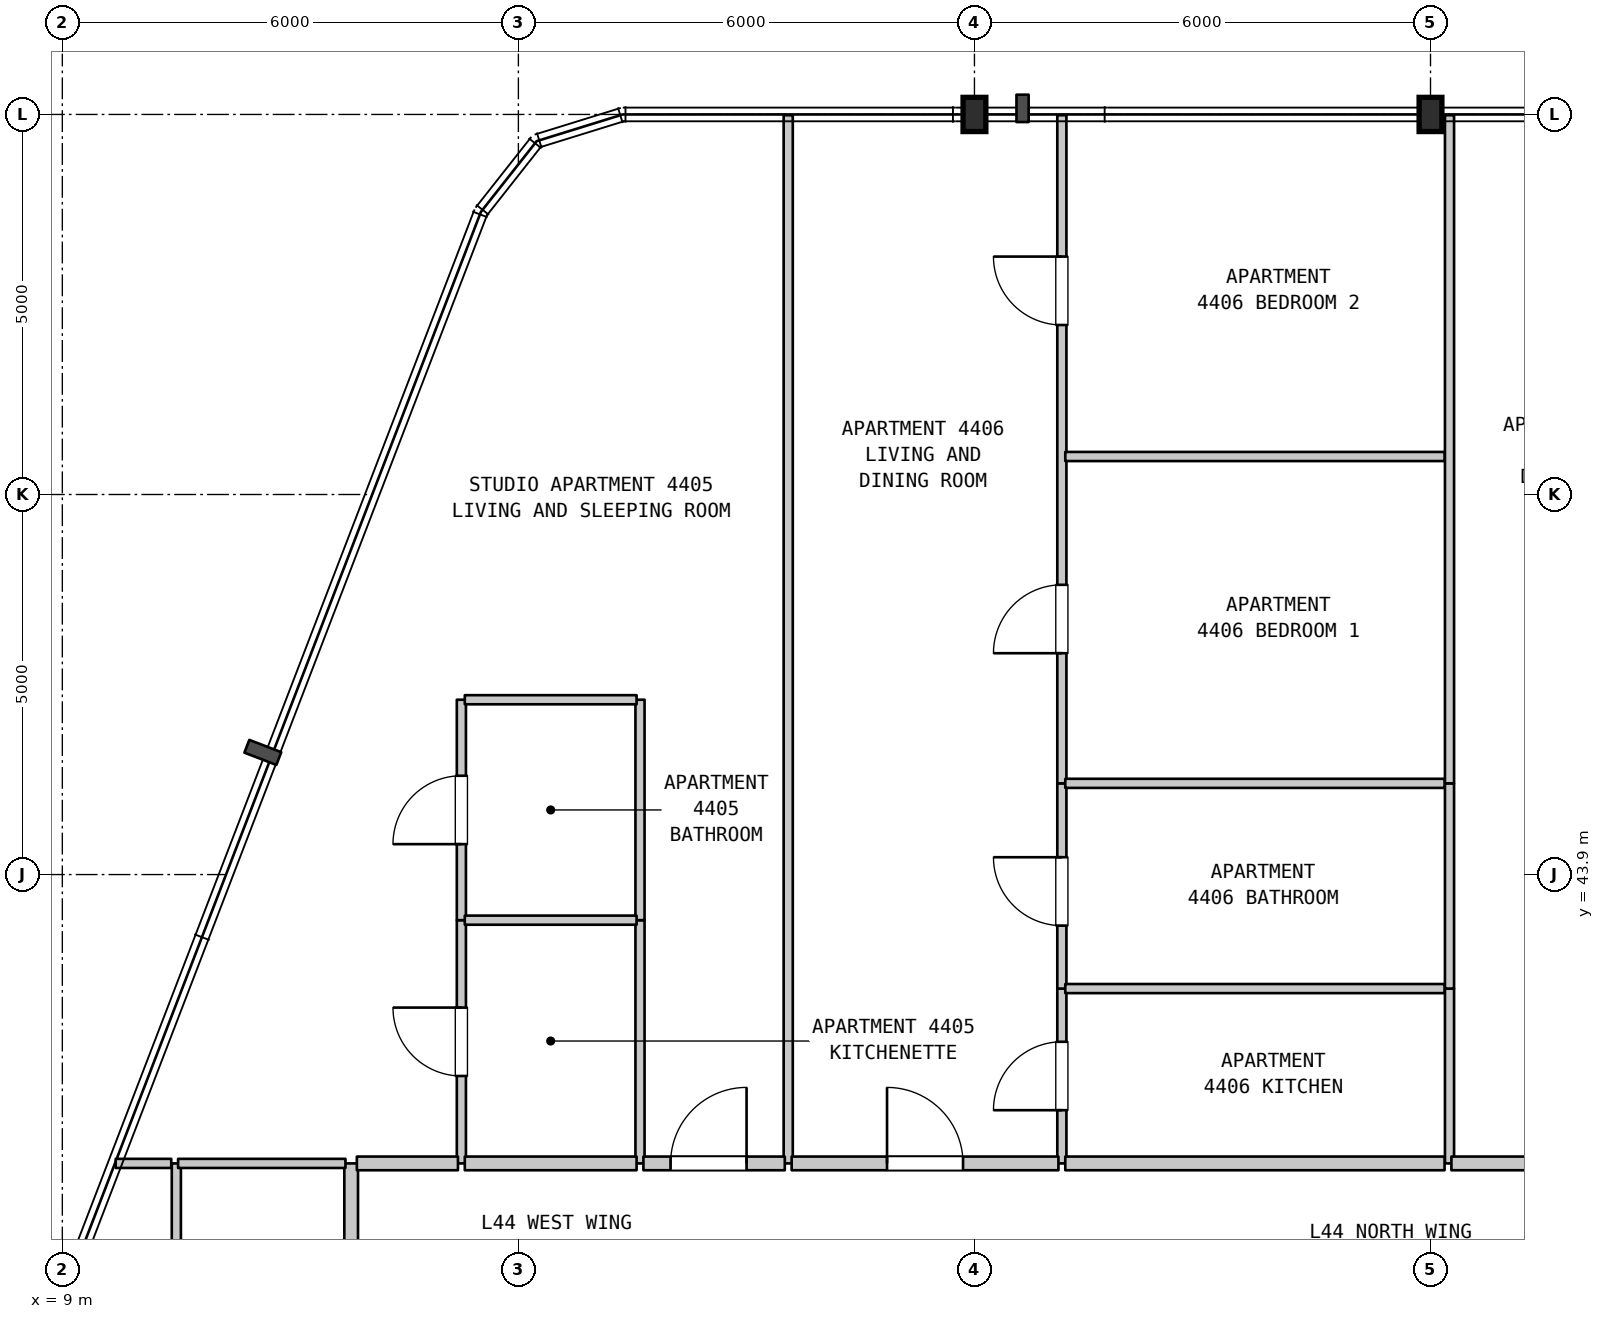
"""IFC4 building model, lengths in metres.
Left out: names, types, materials, properties, quantities, classifications, styles, units other than length and angle.
Written with IfcOpenShell. Run it as: python <this file> out.ifc"""

import sys

from ifc_helpers import new_model, si_unit, direction, frame, frame_2d, origin, origin_2d, place, context, subcontext, project, spatial, rectangle, i_section, extrude, element, fill, save


model = new_model("IFC4")
c1 = context("Model", 3, precision=1e-05, world=origin(), true_north=direction((0.0, 1.0)))
c2 = subcontext(c1, "Body", "Model", "MODEL_VIEW")
j1 = project(units=[si_unit("LENGTHUNIT", "METRE"), si_unit("PLANEANGLEUNIT", "RADIAN")], contexts=[c1])
p1 = place(None, origin())
s1 = spatial("IfcSite", under=j1, at=p1, CompositionType="ELEMENT")
p2 = place(p1, origin())
s2 = spatial("IfcBuilding", under=s1, at=p2, CompositionType="ELEMENT")
p3 = place(p2, frame((0.0, 0.0, 180.2)))
s3 = spatial("IfcBuildingStorey", under=s2, at=p3, CompositionType="ELEMENT", Elevation=180.2)
for number, where, z_axis, x_axis in (
    (1, (21.0, 53.9, 0.0), (0.0, 0.0, 1.0), (1.0, 0.0, 0.0)),
    (2, (27.0, 53.9, 0.0), (0.0, 0.0, 1.0), (1.0, 0.0, 0.0)),
):
    element("IfcColumn", number, at=place(p3, frame(where, z_axis=z_axis, x_axis=x_axis)), inside=s3, PredefinedType="COLUMN", context=c2, shape_type="SweptSolid", body=[
        extrude(i_section(OverallWidth=0.3, OverallDepth=0.45, WebThickness=0.014, FlangeThickness=0.026, FilletRadius=0.027, at=origin_2d()), origin(), (0.0, 0.0, 1.0), 3.7),
    ])
p4 = place(p3, frame((10.5, 31.45, 0.0), z_axis=(0.0, 0.0, 1.0), x_axis=(0.0, 1.0, 0.0)))
e3 = element("IfcWall", 3, at=p4, inside=s3, PredefinedType="PARTITIONING", context=c2, shape_type="SweptSolid", body=[
    extrude(rectangle(XDim=8.65, YDim=0.12, at=frame_2d((4.325, 0.0))), origin(), (0.0, 0.0, 1.0), 3.38),
])
p5 = place(p3, frame((12.8, 31.45, 0.0), z_axis=(0.0, 0.0, 1.0), x_axis=(0.0, 1.0, 0.0)))
e4 = element("IfcWall", 4, at=p5, inside=s3, PredefinedType="STANDARD", context=c2, shape_type="SweptSolid", body=[
    extrude(rectangle(XDim=8.65, YDim=0.18, at=frame_2d((4.325, 0.0))), origin(), (0.0, 0.0, 1.0), 3.38),
])
p6 = place(p3, frame((14.25, 40.1, 0.0), z_axis=(0.0, 0.0, 1.0), x_axis=(0.0, 1.0, 0.0)))
e5 = element("IfcWall", 5, at=p6, inside=s3, PredefinedType="PARTITIONING", context=c2, shape_type="SweptSolid", body=[
    extrude(rectangle(XDim=3.2, YDim=0.12, at=frame_2d((1.6, 0.0))), origin(), (0.0, 0.0, 1.0), 3.38),
])
p7 = place(p6, frame((1.15, 0.0, 0.0)))
e6 = element("IfcOpeningElement", 6, at=p7, cuts=e5, PredefinedType="OPENING", context=c2, shape_type="SweptSolid", body=[
    extrude(rectangle(XDim=0.9, YDim=2.15, at=frame_2d((0.45, 1.075))), frame((0.0, 0.07, 0.0), z_axis=(0.0, -1.0, 0.0), x_axis=(1.0, 0.0, 0.0)), (0.0, 0.0, 1.0), 0.14),
])
p8 = place(p3, frame((14.25, 43.3, 0.0), z_axis=(0.0, 0.0, 1.0), x_axis=(0.0, 1.0, 0.0)))
e7 = element("IfcWall", 7, at=p8, inside=s3, PredefinedType="PARTITIONING", context=c2, shape_type="SweptSolid", body=[
    extrude(rectangle(XDim=2.9, YDim=0.12, at=frame_2d((1.45, 0.0))), origin(), (0.0, 0.0, 1.0), 3.38),
])
p9 = place(p8, frame((1.0, 0.0, 0.0)))
e8 = element("IfcOpeningElement", 8, at=p9, cuts=e7, PredefinedType="OPENING", context=c2, shape_type="SweptSolid", body=[
    extrude(rectangle(XDim=0.9, YDim=2.1, at=frame_2d((0.45, 1.05))), frame((0.0, 0.07, 0.0), z_axis=(0.0, -1.0, 0.0), x_axis=(1.0, 0.0, 0.0)), (0.0, 0.0, 1.0), 0.14),
])
p10 = place(p3, frame((16.6, 40.1, 0.0), z_axis=(0.0, 0.0, 1.0), x_axis=(0.0, 1.0, 0.0)))
e9 = element("IfcWall", 9, at=p10, inside=s3, PredefinedType="PARTITIONING", context=c2, shape_type="SweptSolid", body=[
    extrude(rectangle(XDim=3.2, YDim=0.12, at=frame_2d((1.6, 0.0))), origin(), (0.0, 0.0, 1.0), 3.38),
])
p11 = place(p3, frame((16.6, 43.3, 0.0), z_axis=(0.0, 0.0, 1.0), x_axis=(0.0, 1.0, 0.0)))
e10 = element("IfcWall", 10, at=p11, inside=s3, PredefinedType="PARTITIONING", context=c2, shape_type="SweptSolid", body=[
    extrude(rectangle(XDim=2.9, YDim=0.12, at=frame_2d((1.45, 0.0))), origin(), (0.0, 0.0, 1.0), 3.38),
])
p12 = place(p3, frame((18.55, 40.1, 0.0), z_axis=(0.0, 0.0, 1.0), x_axis=(0.0, 1.0, 0.0)))
e11 = element("IfcWall", 11, at=p12, inside=s3, PredefinedType="PARTITIONING", context=c2, shape_type="SweptSolid", body=[
    extrude(rectangle(XDim=13.79, YDim=0.12, at=frame_2d((6.895, 0.0))), origin(), (0.0, 0.0, 1.0), 3.38),
])
p13 = place(p3, frame((22.15, 40.1, 0.0), z_axis=(0.0, 0.0, 1.0), x_axis=(0.0, 1.0, 0.0)))
e12 = element("IfcWall", 12, at=p13, inside=s3, PredefinedType="PARTITIONING", context=c2, shape_type="SweptSolid", body=[
    extrude(rectangle(XDim=2.3, YDim=0.12, at=frame_2d((1.15, 0.0))), origin(), (0.0, 0.0, 1.0), 3.38),
])
p14 = place(p13, frame((0.7, 0.0, 0.0)))
e13 = element("IfcOpeningElement", 13, at=p14, cuts=e12, PredefinedType="OPENING", context=c2, shape_type="SweptSolid", body=[
    extrude(rectangle(XDim=0.9, YDim=2.15, at=frame_2d((0.45, 1.075))), frame((0.0, 0.07, 0.0), z_axis=(0.0, -1.0, 0.0), x_axis=(1.0, 0.0, 0.0)), (0.0, 0.0, 1.0), 0.14),
])
p15 = place(p3, frame((22.15, 42.4, 0.0), z_axis=(0.0, 0.0, 1.0), x_axis=(0.0, 1.0, 0.0)))
e14 = element("IfcWall", 14, at=p15, inside=s3, PredefinedType="PARTITIONING", context=c2, shape_type="SweptSolid", body=[
    extrude(rectangle(XDim=2.7, YDim=0.12, at=frame_2d((1.35, 0.0))), origin(), (0.0, 0.0, 1.0), 3.38),
])
p16 = place(p15, frame((0.828, 0.0, 0.0)))
e15 = element("IfcOpeningElement", 15, at=p16, cuts=e14, PredefinedType="OPENING", context=c2, shape_type="SweptSolid", body=[
    extrude(rectangle(XDim=0.9, YDim=2.1, at=frame_2d((0.45, 1.05))), frame((0.0, 0.07, 0.0), z_axis=(0.0, -1.0, 0.0), x_axis=(1.0, 0.0, 0.0)), (0.0, 0.0, 1.0), 0.14),
])
p17 = place(p3, frame((22.15, 45.1, 0.0), z_axis=(0.0, 0.0, 1.0), x_axis=(0.0, 1.0, 0.0)))
e16 = element("IfcWall", 16, at=p17, inside=s3, PredefinedType="PARTITIONING", context=c2, shape_type="SweptSolid", body=[
    extrude(rectangle(XDim=8.79, YDim=0.12, at=frame_2d((4.395, 0.0))), origin(), (0.0, 0.0, 1.0), 3.38),
])
p18 = place(p17, frame((1.712, 0.0, 0.0)))
e17 = element("IfcOpeningElement", 17, at=p18, cuts=e16, PredefinedType="OPENING", context=c2, shape_type="SweptSolid", body=[
    extrude(rectangle(XDim=0.9, YDim=2.15, at=frame_2d((0.45, 1.075))), frame((0.0, 0.07, 0.0), z_axis=(0.0, -1.0, 0.0), x_axis=(1.0, 0.0, 0.0)), (0.0, 0.0, 1.0), 0.14),
])
p19 = place(p17, frame((6.03, 0.0, 0.0)))
e18 = element("IfcOpeningElement", 18, at=p19, cuts=e16, PredefinedType="OPENING", context=c2, shape_type="SweptSolid", body=[
    extrude(rectangle(XDim=0.9, YDim=2.15, at=frame_2d((0.45, 1.075))), frame((0.0, 0.07, 0.0), z_axis=(0.0, -1.0, 0.0), x_axis=(1.0, 0.0, 0.0)), (0.0, 0.0, 1.0), 0.14),
])
p20 = place(p3, frame((27.25, 40.1, 0.0), z_axis=(0.0, 0.0, 1.0), x_axis=(0.0, 1.0, 0.0)))
e19 = element("IfcWall", 19, at=p20, inside=s3, PredefinedType="PARTITIONING", context=c2, shape_type="SweptSolid", body=[
    extrude(rectangle(XDim=2.3, YDim=0.12, at=frame_2d((1.15, 0.0))), origin(), (0.0, 0.0, 1.0), 3.38),
])
p21 = place(p3, frame((27.25, 42.4, 0.0), z_axis=(0.0, 0.0, 1.0), x_axis=(0.0, 1.0, 0.0)))
e20 = element("IfcWall", 20, at=p21, inside=s3, PredefinedType="PARTITIONING", context=c2, shape_type="SweptSolid", body=[
    extrude(rectangle(XDim=2.7, YDim=0.12, at=frame_2d((1.35, 0.0))), origin(), (0.0, 0.0, 1.0), 3.38),
])
p22 = place(p3, frame((27.25, 45.1, 0.0), z_axis=(0.0, 0.0, 1.0), x_axis=(0.0, 1.0, 0.0)))
e21 = element("IfcWall", 21, at=p22, inside=s3, PredefinedType="PARTITIONING", context=c2, shape_type="SweptSolid", body=[
    extrude(rectangle(XDim=8.79, YDim=0.12, at=frame_2d((4.395, 0.0))), origin(), (0.0, 0.0, 1.0), 3.38),
])
p23 = place(p3, frame((9.702, 40.1, 0.0), z_axis=(0.0, 0.0, 1.0), x_axis=(1.0, 0.0, 0.0)))
e22 = element("IfcWall", 22, at=p23, inside=s3, PredefinedType="PARTITIONING", context=c2, shape_type="SweptSolid", body=[
    extrude(rectangle(XDim=0.731, YDim=0.12, at=frame_2d((0.366, 0.0))), origin(), (0.0, 0.0, 1.0), 3.38),
])
p24 = place(p3, frame((10.523, 40.1, 0.0), z_axis=(0.0, 0.0, 1.0), x_axis=(1.0, 0.0, 0.0)))
e23 = element("IfcWall", 23, at=p24, inside=s3, PredefinedType="PARTITIONING", context=c2, shape_type="SweptSolid", body=[
    extrude(rectangle(XDim=2.202, YDim=0.12, at=frame_2d((1.101, 0.0))), origin(), (0.0, 0.0, 1.0), 3.38),
])
p25 = place(p3, frame((12.875, 40.1, 0.0), z_axis=(0.0, 0.0, 1.0), x_axis=(1.0, 0.0, 0.0)))
e24 = element("IfcWall", 24, at=p25, inside=s3, PredefinedType="STANDARD", context=c2, shape_type="SweptSolid", body=[
    extrude(rectangle(XDim=1.33, YDim=0.18, at=frame_2d((0.665, 0.0))), origin(), (0.0, 0.0, 1.0), 3.38),
])
p26 = place(p3, frame((14.295, 40.1, 0.0), z_axis=(0.0, 0.0, 1.0), x_axis=(1.0, 0.0, 0.0)))
e25 = element("IfcWall", 25, at=p26, inside=s3, PredefinedType="STANDARD", context=c2, shape_type="SweptSolid", body=[
    extrude(rectangle(XDim=2.26, YDim=0.18, at=frame_2d((1.13, 0.0))), origin(), (0.0, 0.0, 1.0), 3.38),
])
p27 = place(p3, frame((16.645, 40.1, 0.0), z_axis=(0.0, 0.0, 1.0), x_axis=(1.0, 0.0, 0.0)))
e26 = element("IfcWall", 26, at=p27, inside=s3, PredefinedType="STANDARD", context=c2, shape_type="SweptSolid", body=[
    extrude(rectangle(XDim=1.86, YDim=0.18, at=frame_2d((0.93, 0.0))), origin(), (0.0, 0.0, 1.0), 3.38),
])
p28 = place(p27, frame((0.357, 0.0, 0.0)))
e27 = element("IfcOpeningElement", 27, at=p28, cuts=e26, PredefinedType="OPENING", context=c2, shape_type="SweptSolid", body=[
    extrude(rectangle(XDim=1.0, YDim=2.15, at=frame_2d((0.5, 1.075))), frame((0.0, 0.1, 0.0), z_axis=(0.0, -1.0, 0.0), x_axis=(1.0, 0.0, 0.0)), (0.0, 0.0, 1.0), 0.2),
])
p29 = place(p3, frame((18.595, 40.1, 0.0), z_axis=(0.0, 0.0, 1.0), x_axis=(1.0, 0.0, 0.0)))
e28 = element("IfcWall", 28, at=p29, inside=s3, PredefinedType="STANDARD", context=c2, shape_type="SweptSolid", body=[
    extrude(rectangle(XDim=3.51, YDim=0.18, at=frame_2d((1.755, 0.0))), origin(), (0.0, 0.0, 1.0), 3.38),
])
p30 = place(p29, frame((1.255, 0.0, 0.0)))
e29 = element("IfcOpeningElement", 29, at=p30, cuts=e28, PredefinedType="OPENING", context=c2, shape_type="SweptSolid", body=[
    extrude(rectangle(XDim=1.0, YDim=2.15, at=frame_2d((0.5, 1.075))), frame((0.0, 0.1, 0.0), z_axis=(0.0, -1.0, 0.0), x_axis=(1.0, 0.0, 0.0)), (0.0, 0.0, 1.0), 0.2),
])
p31 = place(p3, frame((22.195, 40.1, 0.0), z_axis=(0.0, 0.0, 1.0), x_axis=(1.0, 0.0, 0.0)))
e30 = element("IfcWall", 30, at=p31, inside=s3, PredefinedType="STANDARD", context=c2, shape_type="SweptSolid", body=[
    extrude(rectangle(XDim=4.99, YDim=0.18, at=frame_2d((2.495, 0.0))), origin(), (0.0, 0.0, 1.0), 3.38),
])
p32 = place(p3, frame((27.275, 40.1, 0.0), z_axis=(0.0, 0.0, 1.0), x_axis=(1.0, 0.0, 0.0)))
e31 = element("IfcWall", 31, at=p32, inside=s3, PredefinedType="STANDARD", context=c2, shape_type="SweptSolid", body=[
    extrude(rectangle(XDim=3.51, YDim=0.18, at=frame_2d((1.755, 0.0))), origin(), (0.0, 0.0, 1.0), 3.38),
])
p33 = place(p32, frame((1.255, 0.0, 0.0)))
e32 = element("IfcOpeningElement", 32, at=p33, cuts=e31, PredefinedType="OPENING", context=c2, shape_type="SweptSolid", body=[
    extrude(rectangle(XDim=1.0, YDim=2.15, at=frame_2d((0.5, 1.075))), frame((0.0, 0.1, 0.0), z_axis=(0.0, -1.0, 0.0), x_axis=(1.0, 0.0, 0.0)), (0.0, 0.0, 1.0), 0.2),
])
p34 = place(p3, frame((22.195, 42.4, 0.0), z_axis=(0.0, 0.0, 1.0), x_axis=(1.0, 0.0, 0.0)))
e33 = element("IfcWall", 33, at=p34, inside=s3, PredefinedType="PARTITIONING", context=c2, shape_type="SweptSolid", body=[
    extrude(rectangle(XDim=4.99, YDim=0.12, at=frame_2d((2.495, 0.0))), origin(), (0.0, 0.0, 1.0), 3.38),
])
p35 = place(p3, frame((14.295, 43.3, 0.0), z_axis=(0.0, 0.0, 1.0), x_axis=(1.0, 0.0, 0.0)))
e34 = element("IfcWall", 34, at=p35, inside=s3, PredefinedType="PARTITIONING", context=c2, shape_type="SweptSolid", body=[
    extrude(rectangle(XDim=2.26, YDim=0.12, at=frame_2d((1.13, 0.0))), origin(), (0.0, 0.0, 1.0), 3.38),
])
p36 = place(p3, frame((22.195, 45.1, 0.0), z_axis=(0.0, 0.0, 1.0), x_axis=(1.0, 0.0, 0.0)))
e35 = element("IfcWall", 35, at=p36, inside=s3, PredefinedType="PARTITIONING", context=c2, shape_type="SweptSolid", body=[
    extrude(rectangle(XDim=4.99, YDim=0.12, at=frame_2d((2.495, 0.0))), origin(), (0.0, 0.0, 1.0), 3.38),
])
p37 = place(p3, frame((14.295, 46.2, 0.0), z_axis=(0.0, 0.0, 1.0), x_axis=(1.0, 0.0, 0.0)))
e36 = element("IfcWall", 36, at=p37, inside=s3, PredefinedType="PARTITIONING", context=c2, shape_type="SweptSolid", body=[
    extrude(rectangle(XDim=2.26, YDim=0.12, at=frame_2d((1.13, 0.0))), origin(), (0.0, 0.0, 1.0), 3.38),
])
p38 = place(p3, frame((22.195, 49.4, 0.0), z_axis=(0.0, 0.0, 1.0), x_axis=(1.0, 0.0, 0.0)))
e37 = element("IfcWall", 37, at=p38, inside=s3, PredefinedType="PARTITIONING", context=c2, shape_type="SweptSolid", body=[
    extrude(rectangle(XDim=4.99, YDim=0.12, at=frame_2d((2.495, 0.0))), origin(), (0.0, 0.0, 1.0), 3.38),
])
p39 = place(p7, origin())
e38 = element("IfcDoor", 38, at=p39, inside=s3, OperationType="SINGLE_SWING_RIGHT", PredefinedType="DOOR", context=c2, shape_type="SweptSolid", body=[
    extrude(rectangle(XDim=0.9, YDim=2.15, at=frame_2d((0.45, 1.075))), frame((0.0, 0.025, 0.0), z_axis=(0.0, -1.0, 0.0), x_axis=(1.0, 0.0, 0.0)), (0.0, 0.0, 1.0), 0.05),
])
fill(e6, e38)
p40 = place(p9, origin())
e39 = element("IfcDoor", 39, at=p40, inside=s3, OperationType="SINGLE_SWING_LEFT", PredefinedType="DOOR", context=c2, shape_type="SweptSolid", body=[
    extrude(rectangle(XDim=0.9, YDim=2.1, at=frame_2d((0.45, 1.05))), frame((0.0, 0.025, 0.0), z_axis=(0.0, -1.0, 0.0), x_axis=(1.0, 0.0, 0.0)), (0.0, 0.0, 1.0), 0.05),
])
fill(e8, e39)
p41 = place(p14, origin())
e40 = element("IfcDoor", 40, at=p41, inside=s3, OperationType="SINGLE_SWING_LEFT", PredefinedType="DOOR", context=c2, shape_type="SweptSolid", body=[
    extrude(rectangle(XDim=0.9, YDim=2.15, at=frame_2d((0.45, 1.075))), frame((0.0, 0.025, 0.0), z_axis=(0.0, -1.0, 0.0), x_axis=(1.0, 0.0, 0.0)), (0.0, 0.0, 1.0), 0.05),
])
fill(e13, e40)
p42 = place(p16, origin())
e41 = element("IfcDoor", 41, at=p42, inside=s3, OperationType="SINGLE_SWING_RIGHT", PredefinedType="DOOR", context=c2, shape_type="SweptSolid", body=[
    extrude(rectangle(XDim=0.9, YDim=2.1, at=frame_2d((0.45, 1.05))), frame((0.0, 0.025, 0.0), z_axis=(0.0, -1.0, 0.0), x_axis=(1.0, 0.0, 0.0)), (0.0, 0.0, 1.0), 0.05),
])
fill(e15, e41)
p43 = place(p18, origin())
e42 = element("IfcDoor", 42, at=p43, inside=s3, OperationType="SINGLE_SWING_LEFT", PredefinedType="DOOR", context=c2, shape_type="SweptSolid", body=[
    extrude(rectangle(XDim=0.9, YDim=2.15, at=frame_2d((0.45, 1.075))), frame((0.0, 0.025, 0.0), z_axis=(0.0, -1.0, 0.0), x_axis=(1.0, 0.0, 0.0)), (0.0, 0.0, 1.0), 0.05),
])
fill(e17, e42)
p44 = place(p19, origin())
e43 = element("IfcDoor", 43, at=p44, inside=s3, OperationType="SINGLE_SWING_RIGHT", PredefinedType="DOOR", context=c2, shape_type="SweptSolid", body=[
    extrude(rectangle(XDim=0.9, YDim=2.15, at=frame_2d((0.45, 1.075))), frame((0.0, 0.025, 0.0), z_axis=(0.0, -1.0, 0.0), x_axis=(1.0, 0.0, 0.0)), (0.0, 0.0, 1.0), 0.05),
])
fill(e18, e43)
p45 = place(p28, origin())
e44 = element("IfcDoor", 44, at=p45, inside=s3, OperationType="SINGLE_SWING_RIGHT", PredefinedType="DOOR", context=c2, shape_type="SweptSolid", body=[
    extrude(rectangle(XDim=1.0, YDim=2.15, at=frame_2d((0.5, 1.075))), frame((0.0, 0.025, 0.0), z_axis=(0.0, -1.0, 0.0), x_axis=(1.0, 0.0, 0.0)), (0.0, 0.0, 1.0), 0.05),
])
fill(e27, e44)
p46 = place(p30, origin())
e45 = element("IfcDoor", 45, at=p46, inside=s3, OperationType="SINGLE_SWING_LEFT", PredefinedType="DOOR", context=c2, shape_type="SweptSolid", body=[
    extrude(rectangle(XDim=1.0, YDim=2.15, at=frame_2d((0.5, 1.075))), frame((0.0, 0.025, 0.0), z_axis=(0.0, -1.0, 0.0), x_axis=(1.0, 0.0, 0.0)), (0.0, 0.0, 1.0), 0.05),
])
fill(e29, e45)
save(model, sys.argv[1])
